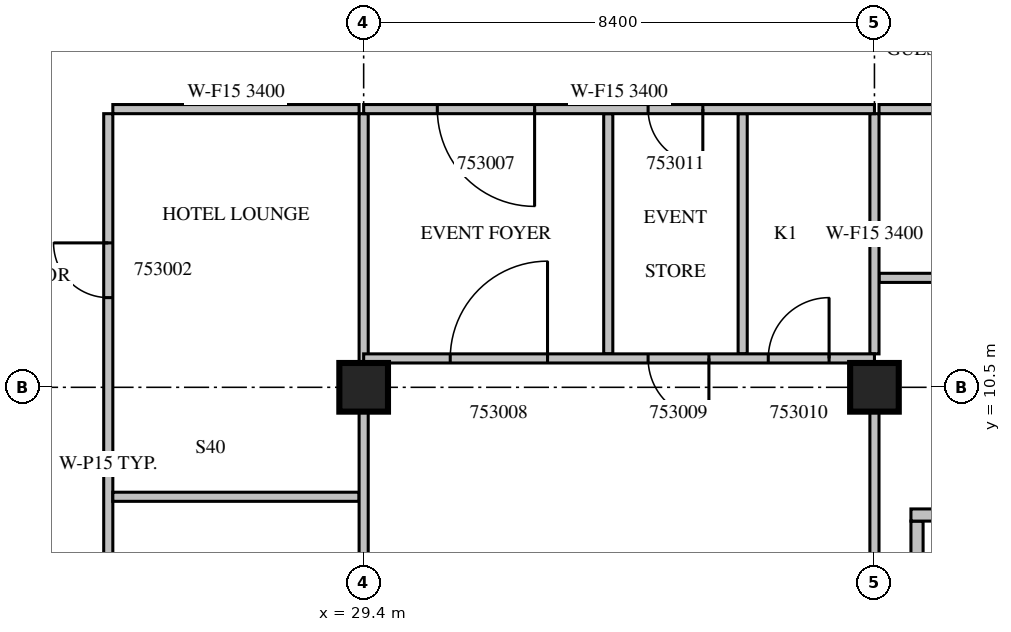
"""IFC4 building model, lengths in metres.
Left out: names, types, materials, properties, quantities, classifications, styles, units other than length and angle.
Written with IfcOpenShell. Run it as: python <this file> out.ifc"""

import sys

from ifc_helpers import new_model, si_unit, direction, frame, frame_2d, origin, origin_2d, place, context, subcontext, project, spatial, rectangle, extrude, source, transform, mapped, element, fill, save


model = new_model("IFC4")
c1 = context("Model", 3, precision=1e-05, world=origin(), true_north=direction((0.0, 1.0)))
c2 = subcontext(c1, "Body", "Model", "MODEL_VIEW")
j1 = project(units=[si_unit("LENGTHUNIT", "METRE"), si_unit("PLANEANGLEUNIT", "RADIAN")], contexts=[c1])
p1 = place(None, origin())
s1 = spatial("IfcSite", under=j1, at=p1, CompositionType="ELEMENT")
p2 = place(p1, origin())
s2 = spatial("IfcBuilding", under=s1, at=p2, CompositionType="ELEMENT")
p3 = place(p2, frame((0.0, 0.0, 234.8)))
s3 = spatial("IfcBuildingStorey", under=s2, at=p3, CompositionType="ELEMENT", Elevation=234.8)
m1 = source(origin(), c2, "Body", "SweptSolid", [
    extrude(rectangle(XDim=0.8, YDim=0.8, at=origin_2d()), origin(), (0.0, 0.0, 1.0), 3.8),
])
for number, where, z_axis, x_axis in (
    (1, (29.4, 10.5, 0.0), (0.0, 0.0, 1.0), (1.0, 0.0, 0.0)),
    (2, (37.8, 10.5, 0.0), (0.0, 0.0, 1.0), (1.0, 0.0, 0.0)),
):
    element("IfcColumn", number, at=place(p3, frame(where, z_axis=z_axis, x_axis=x_axis)), inside=s3, PredefinedType="COLUMN", context=c2, shape_type="MappedRepresentation", body=[
        mapped(m1, transform((0.0, 0.0, 0.0), scale=1.0)),
    ])
m2 = source(origin(), c2, "Body", "SweptSolid", [
    extrude(rectangle(XDim=8.0, YDim=0.2, at=frame_2d((4.0, 0.0))), origin(), (0.0, 0.0, 1.0), 3.4),
])
p4 = place(p3, frame((38.5, 0.3, 0.0), z_axis=(0.0, 0.0, 1.0), x_axis=(0.0, 1.0, 0.0)))
e3 = element("IfcWall", 3, at=p4, inside=s3, PredefinedType="PARTITIONING", context=c2, shape_type="MappedRepresentation", body=[
    mapped(m2, transform((0.0, 0.0, 0.0), scale=1.0)),
])
m3 = source(origin(), c2, "Body", "SweptSolid", [
    extrude(rectangle(XDim=5.45, YDim=0.2, at=frame_2d((2.725, 0.0))), origin(), (0.0, 0.0, 1.0), 3.4),
])
p5 = place(p3, frame((38.4, 8.4, 0.0), z_axis=(0.0, 0.0, 1.0), x_axis=(1.0, 0.0, 0.0)))
e4 = element("IfcWall", 4, at=p5, inside=s3, PredefinedType="PARTITIONING", context=c2, shape_type="MappedRepresentation", body=[
    mapped(m3, transform((0.0, 0.0, 0.0), scale=1.0)),
])
m4 = source(origin(), c2, "Body", "SweptSolid", [
    extrude(rectangle(XDim=1.2, YDim=2.1, at=frame_2d((0.6, 1.05))), frame((0.0, 0.11, 0.0), z_axis=(0.0, -1.0, 0.0), x_axis=(1.0, 0.0, 0.0)), (0.0, 0.0, 1.0), 0.22),
])
p6 = place(p5, frame((0.4, 0.0, 0.0)))
e5 = element("IfcOpeningElement", 5, at=p6, cuts=e4, PredefinedType="OPENING", context=c2, shape_type="MappedRepresentation", body=[
    mapped(m4, transform((0.0, 0.0, 0.0), scale=1.0)),
])
m5 = source(origin(), c2, "Body", "SweptSolid", [
    extrude(rectangle(XDim=0.9, YDim=2.1, at=frame_2d((0.45, 1.05))), frame((0.0, 0.11, 0.0), z_axis=(0.0, -1.0, 0.0), x_axis=(1.0, 0.0, 0.0)), (0.0, 0.0, 1.0), 0.22),
])
p7 = place(p5, frame((3.25, 0.0, 0.0)))
e6 = element("IfcOpeningElement", 6, at=p7, cuts=e4, PredefinedType="OPENING", context=c2, shape_type="MappedRepresentation", body=[
    mapped(m5, transform((0.0, 0.0, 0.0), scale=1.0)),
])
m6 = source(origin(), c2, "Body", "SweptSolid", [
    extrude(rectangle(XDim=11.525, YDim=0.15, at=frame_2d((5.763, 0.0))), origin(), (0.0, 0.0, 1.0), 3.4),
])
p8 = place(p3, frame((25.2, 15.0, 0.0), z_axis=(0.0, 0.0, 1.0), x_axis=(0.0, -1.0, 0.0)))
e7 = element("IfcWall", 7, at=p8, inside=s3, PredefinedType="PARTITIONING", context=c2, shape_type="MappedRepresentation", body=[
    mapped(m6, transform((0.0, 0.0, 0.0), scale=1.0)),
])
m7 = source(origin(), c2, "Body", "SweptSolid", [
    extrude(rectangle(XDim=0.9, YDim=2.1, at=frame_2d((0.45, 1.05))), frame((0.0, 0.085, 0.0), z_axis=(0.0, -1.0, 0.0), x_axis=(1.0, 0.0, 0.0)), (0.0, 0.0, 1.0), 0.17),
])
p9 = place(p8, frame((8.762, 0.0, 0.0)))
e8 = element("IfcOpeningElement", 8, at=p9, cuts=e7, PredefinedType="OPENING", context=c2, shape_type="MappedRepresentation", body=[
    mapped(m7, transform((0.0, 0.0, 0.0), scale=1.0)),
])
p10 = place(p8, frame((2.125, 0.0, 0.0)))
e9 = element("IfcOpeningElement", 9, at=p10, cuts=e7, PredefinedType="OPENING", context=c2, shape_type="MappedRepresentation", body=[
    mapped(m7, transform((0.0, 0.0, 0.0), scale=1.0)),
])
m8 = source(origin(), c2, "Body", "SweptSolid", [
    extrude(rectangle(XDim=4.05, YDim=0.15, at=frame_2d((2.025, 0.0))), origin(), (0.0, 0.0, 1.0), 3.4),
])
for number, where, z_axis, x_axis in (
    (10, (29.325, 8.7, 0.0), (0.0, 0.0, 1.0), (-1.0, 0.0, 0.0)),
    (11, (29.325, 15.075, 0.0), (0.0, 0.0, 1.0), (-1.0, 0.0, 0.0)),
):
    element("IfcWall", number, at=place(p3, frame(where, z_axis=z_axis, x_axis=x_axis)), inside=s3, PredefinedType="PARTITIONING", context=c2, shape_type="MappedRepresentation", body=[
        mapped(m8, transform((0.0, 0.0, 0.0), scale=1.0)),
    ])
m9 = source(origin(), c2, "Body", "SweptSolid", [
    extrude(rectangle(XDim=6.626, YDim=0.15, at=frame_2d((3.313, 0.0))), origin(), (0.0, 0.0, 1.0), 3.4),
])
p11 = place(p3, frame((29.4, 3.475, 0.0), z_axis=(0.0, 0.0, 1.0), x_axis=(0.0, 1.0, 0.0)))
e12 = element("IfcWall", 12, at=p11, inside=s3, PredefinedType="PARTITIONING", context=c2, shape_type="MappedRepresentation", body=[
    mapped(m9, transform((0.0, 0.0, 0.0), scale=1.0)),
])
m10 = source(origin(), c2, "Body", "SweptSolid", [
    extrude(rectangle(XDim=4.101, YDim=0.15, at=frame_2d((2.05, 0.0))), origin(), (0.0, 0.0, 1.0), 3.4),
])
p12 = place(p3, frame((29.4, 10.899, 0.0), z_axis=(0.0, 0.0, 1.0), x_axis=(0.0, 1.0, 0.0)))
e13 = element("IfcWall", 13, at=p12, inside=s3, PredefinedType="PARTITIONING", context=c2, shape_type="MappedRepresentation", body=[
    mapped(m10, transform((0.0, 0.0, 0.0), scale=1.0)),
])
m11 = source(origin(), c2, "Body", "SweptSolid", [
    extrude(rectangle(XDim=6.45, YDim=0.15, at=frame_2d((3.225, 0.0))), origin(), (0.0, 0.0, 1.0), 3.4),
])
p13 = place(p3, frame((37.875, 12.3, 0.0), z_axis=(0.0, 0.0, 1.0), x_axis=(1.0, 0.0, 0.0)))
e14 = element("IfcWall", 14, at=p13, inside=s3, PredefinedType="PARTITIONING", context=c2, shape_type="MappedRepresentation", body=[
    mapped(m11, transform((0.0, 0.0, 0.0), scale=1.0)),
])
p14 = place(p3, frame((44.325, 15.075, 0.0), z_axis=(0.0, 0.0, 1.0), x_axis=(-1.0, 0.0, 0.0)))
e15 = element("IfcWall", 15, at=p14, inside=s3, PredefinedType="PARTITIONING", context=c2, shape_type="MappedRepresentation", body=[
    mapped(m11, transform((0.0, 0.0, 0.0), scale=1.0)),
])
p15 = place(p14, frame((2.812, 0.0, 0.0)))
e16 = element("IfcOpeningElement", 16, at=p15, cuts=e15, PredefinedType="OPENING", context=c2, shape_type="MappedRepresentation", body=[
    mapped(m7, transform((0.0, 0.0, 0.0), scale=1.0)),
])
m12 = source(origin(), c2, "Body", "SweptSolid", [
    extrude(rectangle(XDim=3.95, YDim=0.15, at=frame_2d((1.975, 0.0))), origin(), (0.0, 0.0, 1.0), 3.4),
])
for number, where, z_axis, x_axis in (
    (17, (33.422, 11.05, 0.0), (0.0, 0.0, 1.0), (0.0, 1.0, 0.0)),
    (18, (35.633, 11.05, 0.0), (0.0, 0.0, 1.0), (0.0, 1.0, 0.0)),
):
    element("IfcWall", number, at=place(p3, frame(where, z_axis=z_axis, x_axis=x_axis)), inside=s3, PredefinedType="PARTITIONING", context=c2, shape_type="MappedRepresentation", body=[
        mapped(m12, transform((0.0, 0.0, 0.0), scale=1.0)),
    ])
m13 = source(origin(), c2, "Body", "SweptSolid", [
    extrude(rectangle(XDim=9.302, YDim=0.15, at=frame_2d((4.651, 0.0))), origin(), (0.0, 0.0, 1.0), 3.4),
])
p16 = place(p3, frame((37.8, 0.799, 0.0), z_axis=(0.0, 0.0, 1.0), x_axis=(0.0, 1.0, 0.0)))
e19 = element("IfcWall", 19, at=p16, inside=s3, PredefinedType="PARTITIONING", context=c2, shape_type="MappedRepresentation", body=[
    mapped(m13, transform((0.0, 0.0, 0.0), scale=1.0)),
])
p17 = place(p3, frame((37.8, 11.05, 0.0), z_axis=(0.0, 0.0, 1.0), x_axis=(0.0, 1.0, 0.0)))
e20 = element("IfcWall", 20, at=p17, inside=s3, PredefinedType="PARTITIONING", context=c2, shape_type="MappedRepresentation", body=[
    mapped(m12, transform((0.0, 0.0, 0.0), scale=1.0)),
])
m14 = source(origin(), c2, "Body", "SweptSolid", [
    extrude(rectangle(XDim=8.4, YDim=0.15, at=frame_2d((4.2, 0.0))), origin(), (0.0, 0.0, 1.0), 3.4),
])
p18 = place(p3, frame((37.8, 10.975, 0.0), z_axis=(0.0, 0.0, 1.0), x_axis=(-1.0, 0.0, 0.0)))
e21 = element("IfcWall", 21, at=p18, inside=s3, PredefinedType="PARTITIONING", context=c2, shape_type="MappedRepresentation", body=[
    mapped(m14, transform((0.0, 0.0, 0.0), scale=1.0)),
])
m15 = source(origin(), c2, "Body", "SweptSolid", [
    extrude(rectangle(XDim=1.6, YDim=2.1, at=frame_2d((0.8, 1.05))), frame((0.0, 0.085, 0.0), z_axis=(0.0, -1.0, 0.0), x_axis=(1.0, 0.0, 0.0)), (0.0, 0.0, 1.0), 0.17),
])
p19 = place(p18, frame((5.376, 0.0, 0.0)))
e22 = element("IfcOpeningElement", 22, at=p19, cuts=e21, PredefinedType="OPENING", context=c2, shape_type="MappedRepresentation", body=[
    mapped(m15, transform((0.0, 0.0, 0.0), scale=1.0)),
])
m16 = source(origin(), c2, "Body", "SweptSolid", [
    extrude(rectangle(XDim=1.0, YDim=2.1, at=frame_2d((0.5, 1.05))), frame((0.0, 0.085, 0.0), z_axis=(0.0, -1.0, 0.0), x_axis=(1.0, 0.0, 0.0)), (0.0, 0.0, 1.0), 0.17),
])
p20 = place(p18, frame((2.722, 0.0, 0.0)))
e23 = element("IfcOpeningElement", 23, at=p20, cuts=e21, PredefinedType="OPENING", context=c2, shape_type="MappedRepresentation", body=[
    mapped(m16, transform((0.0, 0.0, 0.0), scale=1.0)),
])
p21 = place(p18, frame((0.746, 0.0, 0.0)))
e24 = element("IfcOpeningElement", 24, at=p21, cuts=e21, PredefinedType="OPENING", context=c2, shape_type="MappedRepresentation", body=[
    mapped(m16, transform((0.0, 0.0, 0.0), scale=1.0)),
])
p22 = place(p3, frame((37.8, 15.075, 0.0), z_axis=(0.0, 0.0, 1.0), x_axis=(-1.0, 0.0, 0.0)))
e25 = element("IfcWall", 25, at=p22, inside=s3, PredefinedType="PARTITIONING", context=c2, shape_type="MappedRepresentation", body=[
    mapped(m14, transform((0.0, 0.0, 0.0), scale=1.0)),
])
p23 = place(p22, frame((5.589, 0.0, 0.0)))
e26 = element("IfcOpeningElement", 26, at=p23, cuts=e25, PredefinedType="OPENING", context=c2, shape_type="MappedRepresentation", body=[
    mapped(m15, transform((0.0, 0.0, 0.0), scale=1.0)),
])
p24 = place(p22, frame((2.822, 0.0, 0.0)))
e27 = element("IfcOpeningElement", 27, at=p24, cuts=e25, PredefinedType="OPENING", context=c2, shape_type="MappedRepresentation", body=[
    mapped(m7, transform((0.0, 0.0, 0.0), scale=1.0)),
])
m17 = source(origin(), c2, "Body", "SweptSolid", [
    extrude(rectangle(XDim=0.9, YDim=2.1, at=frame_2d((0.45, 1.05))), frame((0.0, 0.025, 0.0), z_axis=(0.0, -1.0, 0.0), x_axis=(1.0, 0.0, 0.0)), (0.0, 0.0, 1.0), 0.05),
])
p25 = place(p10, origin())
e28 = element("IfcDoor", 28, at=p25, inside=s3, OperationType="SINGLE_SWING_RIGHT", PredefinedType="DOOR", context=c2, shape_type="MappedRepresentation", body=[
    mapped(m17, transform((0.0, 0.0, 0.0), scale=1.0)),
])
fill(e9, e28)
m18 = source(origin(), c2, "Body", "SweptSolid", [
    extrude(rectangle(XDim=1.6, YDim=2.1, at=frame_2d((0.8, 1.05))), frame((0.0, 0.025, 0.0), z_axis=(0.0, -1.0, 0.0), x_axis=(1.0, 0.0, 0.0)), (0.0, 0.0, 1.0), 0.05),
])
p26 = place(p23, origin())
e29 = element("IfcDoor", 29, at=p26, inside=s3, OperationType="SINGLE_SWING_LEFT", PredefinedType="DOOR", context=c2, shape_type="MappedRepresentation", body=[
    mapped(m18, transform((0.0, 0.0, 0.0), scale=1.0)),
])
fill(e26, e29)
p27 = place(p19, origin())
e30 = element("IfcDoor", 30, at=p27, inside=s3, OperationType="SINGLE_SWING_RIGHT", PredefinedType="DOOR", context=c2, shape_type="MappedRepresentation", body=[
    mapped(m18, transform((0.0, 0.0, 0.0), scale=1.0)),
])
fill(e22, e30)
m19 = source(origin(), c2, "Body", "SweptSolid", [
    extrude(rectangle(XDim=1.0, YDim=2.1, at=frame_2d((0.5, 1.05))), frame((0.0, 0.025, 0.0), z_axis=(0.0, -1.0, 0.0), x_axis=(1.0, 0.0, 0.0)), (0.0, 0.0, 1.0), 0.05),
])
p28 = place(p20, origin())
e31 = element("IfcDoor", 31, at=p28, inside=s3, OperationType="SINGLE_SWING_LEFT", PredefinedType="DOOR", context=c2, shape_type="MappedRepresentation", body=[
    mapped(m19, transform((0.0, 0.0, 0.0), scale=1.0)),
])
fill(e23, e31)
p29 = place(p21, origin())
e32 = element("IfcDoor", 32, at=p29, inside=s3, OperationType="SINGLE_SWING_RIGHT", PredefinedType="DOOR", context=c2, shape_type="MappedRepresentation", body=[
    mapped(m19, transform((0.0, 0.0, 0.0), scale=1.0)),
])
fill(e24, e32)
p30 = place(p24, origin())
e33 = element("IfcDoor", 33, at=p30, inside=s3, OperationType="SINGLE_SWING_LEFT", PredefinedType="DOOR", context=c2, shape_type="MappedRepresentation", body=[
    mapped(m17, transform((0.0, 0.0, 0.0), scale=1.0)),
])
fill(e27, e33)
save(model, sys.argv[1])
